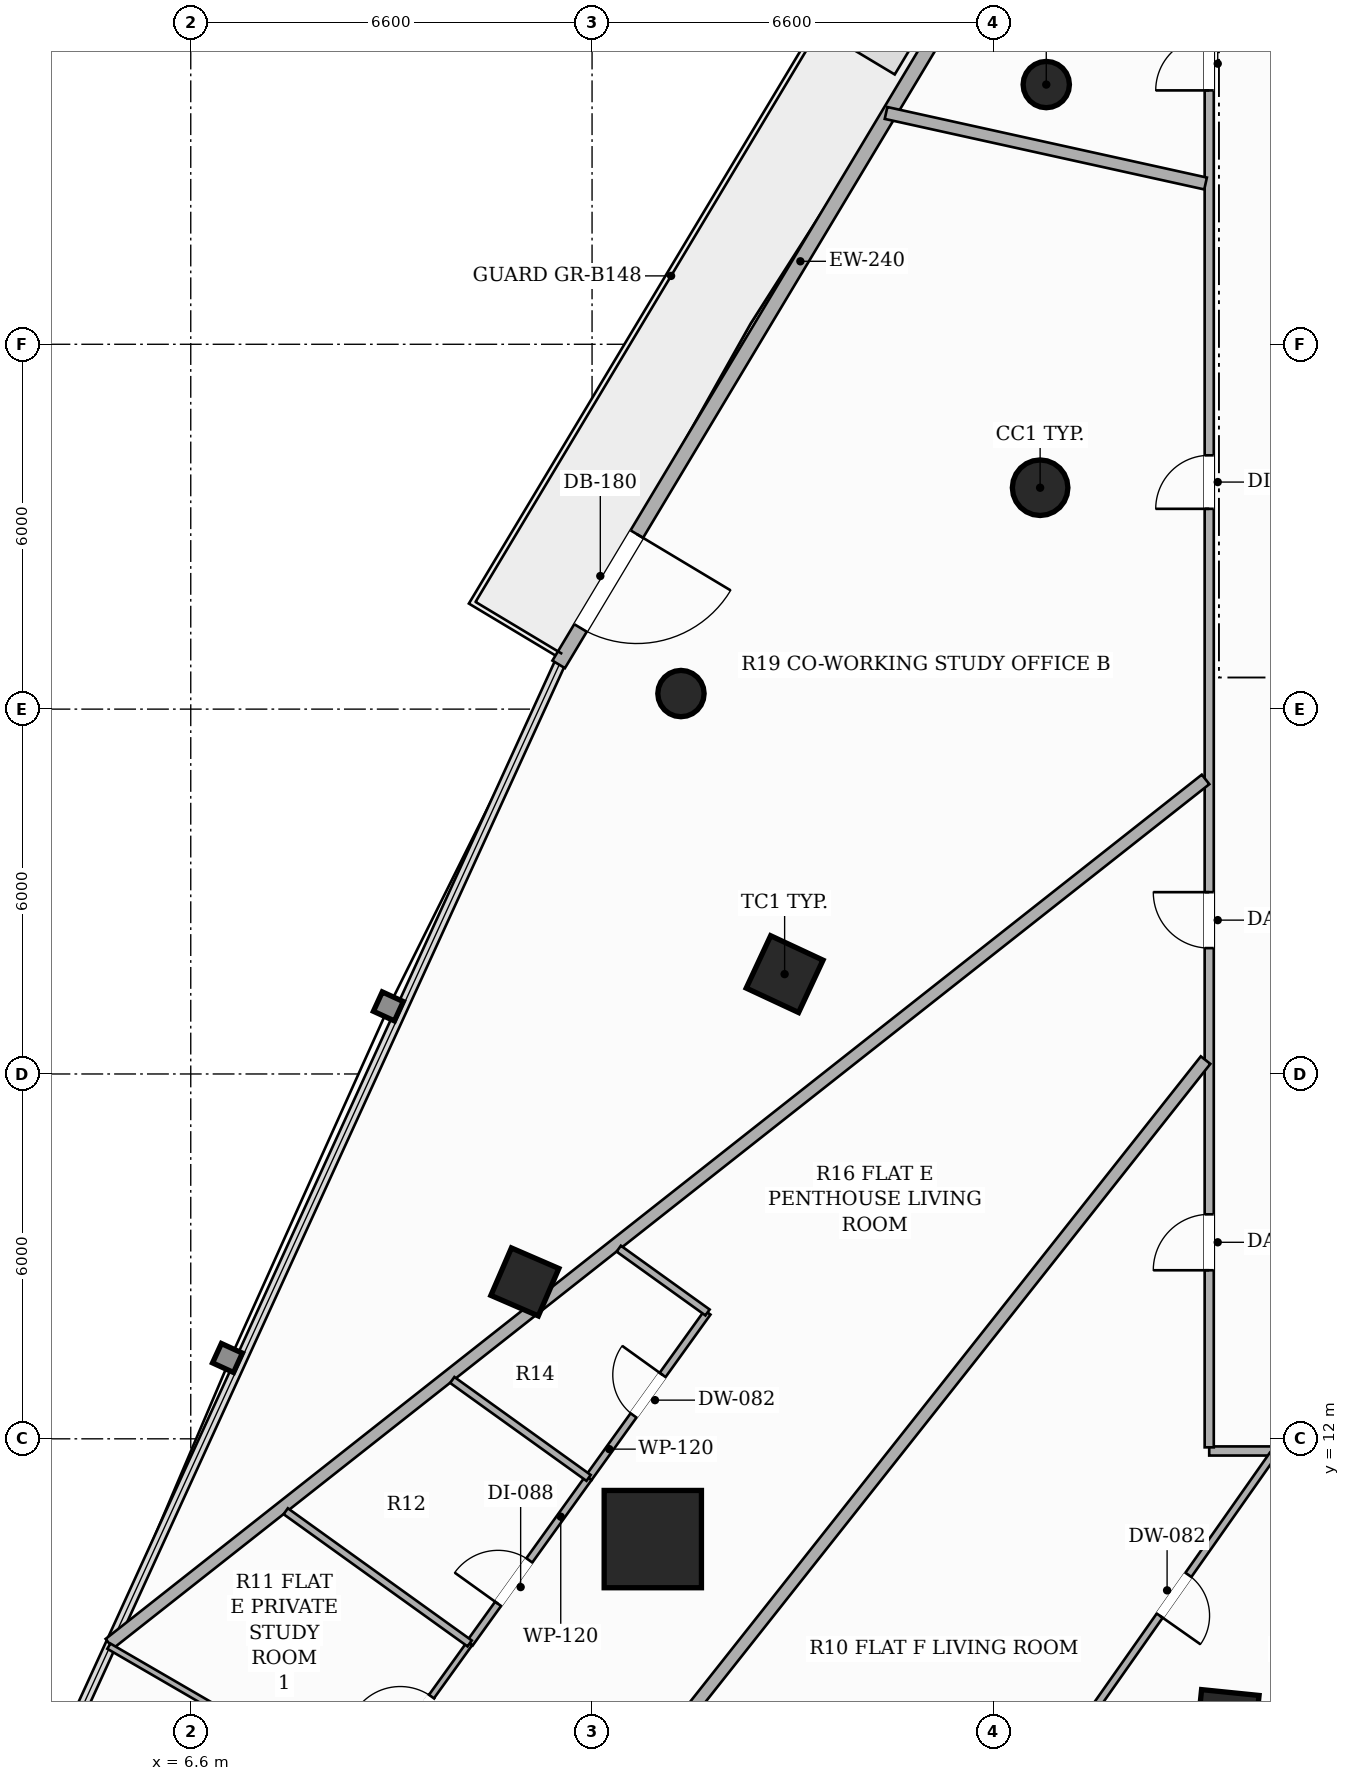
"""IFC4 building model, lengths in metres.
Left out: names, types, materials, properties, quantities, classifications, styles, units other than length and angle.
Written with IfcOpenShell. Run it as: python <this file> out.ifc"""

import sys

from ifc_helpers import new_model, si_unit, direction, frame, frame_2d, origin, origin_2d, place, context, subcontext, project, spatial, rectangle, hollow_rectangle, hollow_circle, extrude, element, fill, save


model = new_model("IFC4")
c1 = context("Model", 3, precision=1e-05, world=origin(), true_north=direction((0.0, 1.0)))
c2 = subcontext(c1, "Body", "Model", "MODEL_VIEW")
j1 = project(units=[si_unit("LENGTHUNIT", "METRE"), si_unit("PLANEANGLEUNIT", "RADIAN")], contexts=[c1])
p1 = place(None, origin())
s1 = spatial("IfcSite", under=j1, at=p1, CompositionType="ELEMENT")
p2 = place(p1, origin())
s2 = spatial("IfcBuilding", under=s1, at=p2, CompositionType="ELEMENT")
p3 = place(p2, frame((0.0, 0.0, 56.6)))
s3 = spatial("IfcBuildingStorey", under=s2, at=p3, CompositionType="ELEMENT", Elevation=56.6)
p4 = place(p3, frame((14.199, 10.351, 0.0), z_axis=(0.0, 0.0, 1.0), x_axis=(1.0, 0.0, 0.0)))
e1 = element("IfcColumn", 1, at=p4, inside=s3, PredefinedType="COLUMN", context=c2, shape_type="SweptSolid", body=[
    extrude(hollow_rectangle(XDim=1.6, YDim=1.6, WallThickness=0.05, at=origin_2d()), origin(), (0.0, 0.0, 1.0), 3.3),
])
p5 = place(p3, frame((20.569, 27.641, 0.0), z_axis=(0.0, 0.0, 1.0), x_axis=(1.0, 0.0, 0.0)))
e2 = element("IfcColumn", 2, at=p5, inside=s3, PredefinedType="COLUMN", context=c2, shape_type="SweptSolid", body=[
    extrude(hollow_circle(Radius=0.457, WallThickness=0.025, at=origin_2d()), origin(), (0.0, 0.0, 1.0), 3.3),
])
for number, where, z_axis, x_axis in (
    (3, (16.367, 19.642, 0.0), (0.0, 0.0, 1.0), (0.423, 0.906, 0.0)),
    (4, (23.649, 7.355, 0.0), (0.0, 0.0, 1.0), (-0.995, 0.101, 0.0)),
):
    element("IfcColumn", number, at=place(p3, frame(where, z_axis=z_axis, x_axis=x_axis)), inside=s3, PredefinedType="COLUMN", context=c2, shape_type="SweptSolid", body=[
        extrude(hollow_rectangle(XDim=0.95, YDim=0.95, WallThickness=0.032, at=origin_2d()), origin(), (0.0, 0.0, 1.0), 3.3),
    ])
p6 = place(p3, frame((12.095, 14.58, 0.0), z_axis=(0.0, 0.0, 1.0), x_axis=(0.397147890635, 0.917754625684, 0.0)))
e5 = element("IfcColumn", 5, at=p6, inside=s3, PredefinedType="COLUMN", context=c2, shape_type="SweptSolid", body=[
    extrude(hollow_rectangle(XDim=0.85, YDim=0.85, WallThickness=0.028, at=origin_2d()), origin(), (0.0, 0.0, 1.0), 3.3),
])
for number, where, z_axis, x_axis in (
    (6, (20.67, 34.271, 0.0), (0.0, 0.0, 1.0), (1.0, 0.0, 0.0)),
    (7, (14.662, 24.256, 0.0), (0.0, 0.0, 1.0), (1.0, 0.0, 0.0)),
):
    element("IfcColumn", number, at=place(p3, frame(where, z_axis=z_axis, x_axis=x_axis)), inside=s3, PredefinedType="COLUMN", context=c2, shape_type="SweptSolid", body=[
        extrude(hollow_circle(Radius=0.381, WallThickness=0.022, at=origin_2d()), origin(), (0.0, 0.0, 1.0), 3.3),
    ])
p7 = place(p3, frame((19.265, 35.765, 0.0), z_axis=(0.0, 0.0, 1.0), x_axis=(-0.51430869017, -0.857605137121, 0.0)))
e8 = element("IfcWall", 8, at=p7, inside=s3, PredefinedType="SOLIDWALL", context=c2, shape_type="SweptSolid", body=[
    extrude(rectangle(XDim=12.86, YDim=0.24, at=frame_2d((6.43, 0.0))), origin(), (0.0, 0.0, 1.0), 2.584),
])
p8 = place(p7, frame((10.362, 0.0, 0.0)))
e9 = element("IfcOpeningElement", 9, at=p8, cuts=e8, PredefinedType="OPENING", context=c2, shape_type="SweptSolid", body=[
    extrude(rectangle(XDim=1.8, YDim=2.2, at=frame_2d((0.9, 1.1))), frame((0.0, 0.13, 0.0), z_axis=(0.0, -1.0, 0.0), x_axis=(1.0, 0.0, 0.0)), (0.0, 0.0, 1.0), 0.26),
])
p9 = place(p3, frame((42.59, 11.8, 0.0), z_axis=(0.0, 0.0, 1.0), x_axis=(-1.0, 0.0, 0.0)))
e10 = element("IfcWall", 10, at=p9, inside=s3, PredefinedType="PARTITIONING", context=c2, shape_type="SweptSolid", body=[
    extrude(rectangle(XDim=19.24, YDim=0.15, at=frame_2d((9.62, 0.0))), origin(), (0.0, 0.0, 1.0), 2.629),
])
p10 = place(p9, frame((11.355, 0.0, 0.0)))
e11 = element("IfcOpeningElement", 11, at=p10, cuts=e10, PredefinedType="OPENING", context=c2, shape_type="SweptSolid", body=[
    extrude(rectangle(XDim=0.92, YDim=2.15, at=frame_2d((0.46, 1.075))), frame((0.0, 0.085, 0.0), z_axis=(0.0, -1.0, 0.0), x_axis=(1.0, 0.0, 0.0)), (0.0, 0.0, 1.0), 0.17),
])
p11 = place(p9, frame((3.524, 0.0, 0.0)))
e12 = element("IfcOpeningElement", 12, at=p11, cuts=e10, PredefinedType="OPENING", context=c2, shape_type="SweptSolid", body=[
    extrude(rectangle(XDim=0.88, YDim=2.1, at=frame_2d((0.44, 1.05))), frame((0.0, 0.085, 0.0), z_axis=(0.0, -1.0, 0.0), x_axis=(1.0, 0.0, 0.0)), (0.0, 0.0, 1.0), 0.17),
])
p12 = place(p3, frame((23.35, 11.86, 0.0), z_axis=(0.0, 0.0, 1.0), x_axis=(0.0, 1.0, 0.0)))
e13 = element("IfcWall", 13, at=p12, inside=s3, PredefinedType="PARTITIONING", context=c2, shape_type="SweptSolid", body=[
    extrude(rectangle(XDim=25.04, YDim=0.15, at=frame_2d((12.52, 0.0))), origin(), (0.0, 0.0, 1.0), 2.373),
])
p13 = place(p12, frame((15.434, 0.0, 0.0)))
e14 = element("IfcOpeningElement", 14, at=p13, cuts=e13, PredefinedType="OPENING", context=c2, shape_type="SweptSolid", body=[
    extrude(rectangle(XDim=0.88, YDim=2.1, at=frame_2d((0.44, 1.05))), frame((0.0, 0.085, 0.0), z_axis=(0.0, -1.0, 0.0), x_axis=(1.0, 0.0, 0.0)), (0.0, 0.0, 1.0), 0.17),
])
p14 = place(p12, frame((22.315, 0.0, 0.0)))
e15 = element("IfcOpeningElement", 15, at=p14, cuts=e13, PredefinedType="OPENING", context=c2, shape_type="SweptSolid", body=[
    extrude(rectangle(XDim=0.88, YDim=2.1, at=frame_2d((0.44, 1.05))), frame((0.0, 0.085, 0.0), z_axis=(0.0, -1.0, 0.0), x_axis=(1.0, 0.0, 0.0)), (0.0, 0.0, 1.0), 0.17),
])
p15 = place(p12, frame((8.21, 0.0, 0.0)))
e16 = element("IfcOpeningElement", 16, at=p15, cuts=e13, PredefinedType="OPENING", context=c2, shape_type="SweptSolid", body=[
    extrude(rectangle(XDim=0.92, YDim=2.15, at=frame_2d((0.46, 1.075))), frame((0.0, 0.085, 0.0), z_axis=(0.0, -1.0, 0.0), x_axis=(1.0, 0.0, 0.0)), (0.0, 0.0, 1.0), 0.17),
])
p16 = place(p12, frame((2.912, 0.0, 0.0)))
e17 = element("IfcOpeningElement", 17, at=p16, cuts=e13, PredefinedType="OPENING", context=c2, shape_type="SweptSolid", body=[
    extrude(rectangle(XDim=0.92, YDim=2.15, at=frame_2d((0.46, 1.075))), frame((0.0, 0.085, 0.0), z_axis=(0.0, -1.0, 0.0), x_axis=(1.0, 0.0, 0.0)), (0.0, 0.0, 1.0), 0.17),
])
p17 = place(p3, frame((18.035, 33.804, 0.0), z_axis=(0.0, 0.0, 1.0), x_axis=(0.976496681047, -0.215532438172, 0.0)))
e18 = element("IfcWall", 18, at=p17, inside=s3, PredefinedType="PARTITIONING", context=c2, shape_type="SweptSolid", body=[
    extrude(rectangle(XDim=5.382, YDim=0.2, at=frame_2d((2.691, 0.0))), origin(), (0.0, 0.0, 1.0), 2.373),
])
p18 = place(p3, frame((23.29, 22.844, 0.0), z_axis=(0.0, 0.0, 1.0), x_axis=(-0.785302077685, -0.619112790034, 0.0)))
e19 = element("IfcWall", 19, at=p18, inside=s3, PredefinedType="PARTITIONING", context=c2, shape_type="SweptSolid", body=[
    extrude(rectangle(XDim=22.957, YDim=0.2, at=frame_2d((11.479, 0.0))), origin(), (0.0, 0.0, 1.0), 2.373),
])
p19 = place(p3, frame((23.29, 18.228, 0.0), z_axis=(0.0, 0.0, 1.0), x_axis=(-0.620501189922, -0.784205504511, 0.0)))
e20 = element("IfcWall", 20, at=p19, inside=s3, PredefinedType="PARTITIONING", context=c2, shape_type="SweptSolid", body=[
    extrude(rectangle(XDim=19.188, YDim=0.2, at=frame_2d((9.594, 0.0))), origin(), (0.0, 0.0, 1.0), 2.373),
])
p20 = place(p3, frame((26.579, 11.74, 0.0), z_axis=(0.0, 0.0, 1.0), x_axis=(-0.32385337678, -0.946107282684, 0.0)))
e21 = element("IfcWall", 21, at=p20, inside=s3, PredefinedType="PARTITIONING", context=c2, shape_type="SweptSolid", body=[
    extrude(rectangle(XDim=10.378, YDim=0.2, at=frame_2d((5.189, 0.0))), origin(), (0.0, 0.0, 1.0), 2.373),
])
p21 = place(p3, frame((13.143, 11.357, 0.0), z_axis=(0.0, 0.0, 1.0), x_axis=(0.583709603858, 0.811962498127, 0.0)))
e22 = element("IfcWall", 22, at=p21, inside=s3, PredefinedType="PARTITIONING", context=c2, shape_type="SweptSolid", body=[
    extrude(rectangle(XDim=3.351, YDim=0.12, at=frame_2d((1.676, 0.0))), origin(), (0.0, 0.0, 1.0), 2.373),
])
p22 = place(p21, frame((1.266, 0.0, 0.0)))
e23 = element("IfcOpeningElement", 23, at=p22, cuts=e22, PredefinedType="OPENING", context=c2, shape_type="SweptSolid", body=[
    extrude(rectangle(XDim=0.82, YDim=2.1, at=frame_2d((0.41, 1.05))), frame((0.0, 0.07, 0.0), z_axis=(0.0, -1.0, 0.0), x_axis=(1.0, 0.0, 0.0)), (0.0, 0.0, 1.0), 0.14),
])
p23 = place(p3, frame((15.099, 14.078, 0.0), z_axis=(0.0, 0.0, 1.0), x_axis=(-0.812134003072, 0.583470959906, 0.0)))
e24 = element("IfcWall", 24, at=p23, inside=s3, PredefinedType="PARTITIONING", context=c2, shape_type="SweptSolid", body=[
    extrude(rectangle(XDim=1.798, YDim=0.12, at=frame_2d((0.899, 0.0))), origin(), (0.0, 0.0, 1.0), 3.02),
])
p24 = place(p3, frame((11.187, 8.635, 0.0), z_axis=(0.0, 0.0, 1.0), x_axis=(0.583571510595, 0.812061753823, 0.0)))
e25 = element("IfcWall", 25, at=p24, inside=s3, PredefinedType="PARTITIONING", context=c2, shape_type="SweptSolid", body=[
    extrude(rectangle(XDim=3.352, YDim=0.12, at=frame_2d((1.676, 0.0))), origin(), (0.0, 0.0, 1.0), 2.579),
])
p25 = place(p24, frame((0.802, 0.0, 0.0)))
e26 = element("IfcOpeningElement", 26, at=p25, cuts=e25, PredefinedType="OPENING", context=c2, shape_type="SweptSolid", body=[
    extrude(rectangle(XDim=0.88, YDim=2.1, at=frame_2d((0.44, 1.05))), frame((0.0, 0.07, 0.0), z_axis=(0.0, -1.0, 0.0), x_axis=(1.0, 0.0, 0.0)), (0.0, 0.0, 1.0), 0.14),
])
p26 = place(p3, frame((9.417, 6.172, 0.0), z_axis=(0.0, 0.0, 1.0), x_axis=(0.583596240012, 0.812043981964, 0.0)))
e27 = element("IfcWall", 27, at=p26, inside=s3, PredefinedType="PARTITIONING", context=c2, shape_type="SweptSolid", body=[
    extrude(rectangle(XDim=3.033, YDim=0.1, at=frame_2d((1.517, 0.0))), origin(), (0.0, 0.0, 1.0), 2.579),
])
p27 = place(p26, frame((1.077, 0.0, 0.0)))
e28 = element("IfcOpeningElement", 28, at=p27, cuts=e27, PredefinedType="OPENING", context=c2, shape_type="SweptSolid", body=[
    extrude(rectangle(XDim=0.88, YDim=2.1, at=frame_2d((0.44, 1.05))), frame((0.0, 0.06, 0.0), z_axis=(0.0, -1.0, 0.0), x_axis=(1.0, 0.0, 0.0)), (0.0, 0.0, 1.0), 0.12),
])
p28 = place(p3, frame((13.143, 11.357, 0.0), z_axis=(0.0, 0.0, 1.0), x_axis=(-0.812099176387, 0.583519432162, 0.0)))
e29 = element("IfcWall", 29, at=p28, inside=s3, PredefinedType="PARTITIONING", context=c2, shape_type="SweptSolid", body=[
    extrude(rectangle(XDim=2.761, YDim=0.12, at=frame_2d((1.38, 0.0))), origin(), (0.0, 0.0, 1.0), 3.02),
])
p29 = place(p3, frame((11.187, 8.635, 0.0), z_axis=(0.0, 0.0, 1.0), x_axis=(-0.812025077548, 0.583622543629, 0.0)))
e30 = element("IfcWall", 30, at=p29, inside=s3, PredefinedType="PARTITIONING", context=c2, shape_type="SweptSolid", body=[
    extrude(rectangle(XDim=3.725, YDim=0.12, at=frame_2d((1.863, 0.0))), origin(), (0.0, 0.0, 1.0), 2.579),
])
p30 = place(p3, frame((5.253, 8.59, 0.0), z_axis=(0.0, 0.0, 1.0), x_axis=(0.864777582771, -0.502155087932, 0.0)))
e31 = element("IfcWall", 31, at=p30, inside=s3, PredefinedType="PARTITIONING", context=c2, shape_type="SweptSolid", body=[
    extrude(rectangle(XDim=4.815, YDim=0.1, at=frame_2d((2.408, 0.0))), origin(), (0.0, 0.0, 1.0), 3.02),
])
p31 = place(p3, frame((24.398, 11.74, 0.0), z_axis=(0.0, 0.0, 1.0), x_axis=(-0.575258030062, -0.817972003707, 0.0)))
e32 = element("IfcWall", 32, at=p31, inside=s3, PredefinedType="PARTITIONING", context=c2, shape_type="SweptSolid", body=[
    extrude(rectangle(XDim=5.653, YDim=0.12, at=frame_2d((2.827, 0.0))), origin(), (0.0, 0.0, 1.0), 2.373),
])
p32 = place(p31, frame((2.417, 0.0, 0.0)))
e33 = element("IfcOpeningElement", 33, at=p32, cuts=e32, PredefinedType="OPENING", context=c2, shape_type="SweptSolid", body=[
    extrude(rectangle(XDim=0.82, YDim=2.1, at=frame_2d((0.41, 1.05))), frame((0.0, 0.07, 0.0), z_axis=(0.0, -1.0, 0.0), x_axis=(1.0, 0.0, 0.0)), (0.0, 0.0, 1.0), 0.14),
])
p33 = place(p8, origin())
e34 = element("IfcDoor", 34, at=p33, inside=s3, OperationType="SINGLE_SWING_LEFT", PredefinedType="DOOR", context=c2, shape_type="SweptSolid", body=[
    extrude(rectangle(XDim=1.8, YDim=2.2, at=frame_2d((0.9, 1.1))), frame((0.0, 0.025, 0.0), z_axis=(0.0, -1.0, 0.0), x_axis=(1.0, 0.0, 0.0)), (0.0, 0.0, 1.0), 0.05),
])
fill(e9, e34)
p34 = place(p13, origin())
e35 = element("IfcDoor", 35, at=p34, inside=s3, OperationType="SINGLE_SWING_LEFT", PredefinedType="DOOR", context=c2, shape_type="SweptSolid", body=[
    extrude(rectangle(XDim=0.88, YDim=2.1, at=frame_2d((0.44, 1.05))), frame((0.0, 0.025, 0.0), z_axis=(0.0, -1.0, 0.0), x_axis=(1.0, 0.0, 0.0)), (0.0, 0.0, 1.0), 0.05),
])
fill(e14, e35)
p35 = place(p14, origin())
e36 = element("IfcDoor", 36, at=p35, inside=s3, OperationType="SINGLE_SWING_LEFT", PredefinedType="DOOR", context=c2, shape_type="SweptSolid", body=[
    extrude(rectangle(XDim=0.88, YDim=2.1, at=frame_2d((0.44, 1.05))), frame((0.0, 0.025, 0.0), z_axis=(0.0, -1.0, 0.0), x_axis=(1.0, 0.0, 0.0)), (0.0, 0.0, 1.0), 0.05),
])
fill(e15, e36)
p36 = place(p15, origin())
e37 = element("IfcDoor", 37, at=p36, inside=s3, OperationType="SINGLE_SWING_RIGHT", PredefinedType="DOOR", context=c2, shape_type="SweptSolid", body=[
    extrude(rectangle(XDim=0.92, YDim=2.15, at=frame_2d((0.46, 1.075))), frame((0.0, 0.025, 0.0), z_axis=(0.0, -1.0, 0.0), x_axis=(1.0, 0.0, 0.0)), (0.0, 0.0, 1.0), 0.05),
])
fill(e16, e37)
p37 = place(p22, origin())
e38 = element("IfcDoor", 38, at=p37, inside=s3, OperationType="SINGLE_SWING_RIGHT", PredefinedType="DOOR", context=c2, shape_type="SweptSolid", body=[
    extrude(rectangle(XDim=0.82, YDim=2.1, at=frame_2d((0.41, 1.05))), frame((0.0, 0.025, 0.0), z_axis=(0.0, -1.0, 0.0), x_axis=(1.0, 0.0, 0.0)), (0.0, 0.0, 1.0), 0.05),
])
fill(e23, e38)
p38 = place(p25, origin())
e39 = element("IfcDoor", 39, at=p38, inside=s3, OperationType="SINGLE_SWING_LEFT", PredefinedType="DOOR", context=c2, shape_type="SweptSolid", body=[
    extrude(rectangle(XDim=0.88, YDim=2.1, at=frame_2d((0.44, 1.05))), frame((0.0, 0.025, 0.0), z_axis=(0.0, -1.0, 0.0), x_axis=(1.0, 0.0, 0.0)), (0.0, 0.0, 1.0), 0.05),
])
fill(e26, e39)
p39 = place(p27, origin())
e40 = element("IfcDoor", 40, at=p39, inside=s3, OperationType="SINGLE_SWING_LEFT", PredefinedType="DOOR", context=c2, shape_type="SweptSolid", body=[
    extrude(rectangle(XDim=0.88, YDim=2.1, at=frame_2d((0.44, 1.05))), frame((0.0, 0.025, 0.0), z_axis=(0.0, -1.0, 0.0), x_axis=(1.0, 0.0, 0.0)), (0.0, 0.0, 1.0), 0.05),
])
fill(e28, e40)
p40 = place(p16, origin())
e41 = element("IfcDoor", 41, at=p40, inside=s3, OperationType="SINGLE_SWING_LEFT", PredefinedType="DOOR", context=c2, shape_type="SweptSolid", body=[
    extrude(rectangle(XDim=0.92, YDim=2.15, at=frame_2d((0.46, 1.075))), frame((0.0, 0.025, 0.0), z_axis=(0.0, -1.0, 0.0), x_axis=(1.0, 0.0, 0.0)), (0.0, 0.0, 1.0), 0.05),
])
fill(e17, e41)
p41 = place(p32, origin())
e42 = element("IfcDoor", 42, at=p41, inside=s3, OperationType="SINGLE_SWING_RIGHT", PredefinedType="DOOR", context=c2, shape_type="SweptSolid", body=[
    extrude(rectangle(XDim=0.82, YDim=2.1, at=frame_2d((0.41, 1.05))), frame((0.0, 0.025, 0.0), z_axis=(0.0, -1.0, 0.0), x_axis=(1.0, 0.0, 0.0)), (0.0, 0.0, 1.0), 0.05),
])
fill(e33, e42)
save(model, sys.argv[1])
